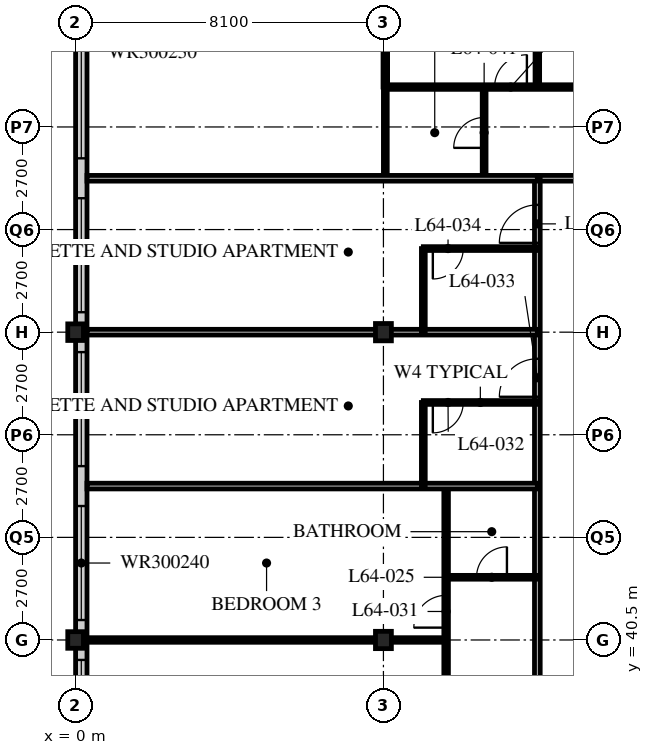
"""IFC4 building model, lengths in metres.
Left out: names, types, materials, properties, quantities, classifications, styles, units other than length and angle.
Written with IfcOpenShell. Run it as: python <this file> out.ifc"""

import sys

from ifc_helpers import new_model, si_unit, direction, frame, frame_2d, origin, origin_2d, place, context, subcontext, project, spatial, rectangle, i_section, extrude, element, fill, save


model = new_model("IFC4")
c1 = context("Model", 3, precision=1e-05, world=origin(), true_north=direction((0.0, 1.0)))
c2 = subcontext(c1, "Body", "Model", "MODEL_VIEW")
j1 = project(units=[si_unit("LENGTHUNIT", "METRE"), si_unit("PLANEANGLEUNIT", "RADIAN")], contexts=[c1])
p1 = place(None, origin())
s1 = spatial("IfcSite", under=j1, at=p1, CompositionType="ELEMENT")
p2 = place(p1, origin())
s2 = spatial("IfcBuilding", under=s1, at=p2, CompositionType="ELEMENT")
p3 = place(p2, frame((0.0, 0.0, 250.2)))
s3 = spatial("IfcBuildingStorey", under=s2, at=p3, CompositionType="ELEMENT", Elevation=250.2)
for number, where, z_axis, x_axis in (
    (1, (0.0, 40.5, 0.0), (0.0, 0.0, 1.0), (1.0, 0.0, 0.0)),
    (2, (0.0, 48.6, 0.0), (0.0, 0.0, 1.0), (1.0, 0.0, 0.0)),
):
    element("IfcColumn", number, at=place(p3, frame(where, z_axis=z_axis, x_axis=x_axis)), inside=s3, PredefinedType="COLUMN", context=c2, shape_type="SweptSolid", body=[
        extrude(i_section(OverallWidth=0.412, OverallDepth=0.437, WebThickness=0.036, FlangeThickness=0.058, FilletRadius=0.015, at=origin_2d()), origin(), (0.0, 0.0, 1.0), 3.9),
    ])
for number, where, z_axis, x_axis in (
    (3, (8.1, 40.5, 0.0), (0.0, 0.0, 1.0), (1.0, 0.0, 0.0)),
    (4, (8.1, 48.6, 0.0), (0.0, 0.0, 1.0), (1.0, 0.0, 0.0)),
):
    element("IfcColumn", number, at=place(p3, frame(where, z_axis=z_axis, x_axis=x_axis)), inside=s3, PredefinedType="COLUMN", context=c2, shape_type="SweptSolid", body=[
        extrude(i_section(OverallWidth=0.418, OverallDepth=0.456, WebThickness=0.042, FlangeThickness=0.067, FilletRadius=0.015, at=origin_2d()), origin(), (0.0, 0.0, 1.0), 3.9),
    ])
p4 = place(p3, frame((0.15, 56.4, 0.0), z_axis=(0.0, 0.0, 1.0), x_axis=(0.0, -1.0, 0.0)))
e5 = element("IfcWall", 5, at=p4, inside=s3, PredefinedType="SOLIDWALL", context=c2, shape_type="SweptSolid", body=[
    extrude(rectangle(XDim=32.1, YDim=0.3, at=frame_2d((16.05, 0.0))), origin(), (0.0, 0.0, 1.0), 3.69),
])
p5 = place(p4, frame((0.225, 0.0, 0.6)))
e6 = element("IfcOpeningElement", 6, at=p5, cuts=e5, PredefinedType="OPENING", context=c2, shape_type="SweptSolid", body=[
    extrude(rectangle(XDim=3.0, YDim=2.4, at=frame_2d((1.5, 1.2))), frame((0.0, 0.16, 0.0), z_axis=(0.0, -1.0, 0.0), x_axis=(1.0, 0.0, 0.0)), (0.0, 0.0, 1.0), 0.32),
])
p6 = place(p4, frame((4.275, 0.0, 0.6)))
e7 = element("IfcOpeningElement", 7, at=p6, cuts=e5, PredefinedType="OPENING", context=c2, shape_type="SweptSolid", body=[
    extrude(rectangle(XDim=3.0, YDim=2.4, at=frame_2d((1.5, 1.2))), frame((0.0, 0.16, 0.0), z_axis=(0.0, -1.0, 0.0), x_axis=(1.0, 0.0, 0.0)), (0.0, 0.0, 1.0), 0.32),
])
p7 = place(p4, frame((8.325, 0.0, 0.6)))
e8 = element("IfcOpeningElement", 8, at=p7, cuts=e5, PredefinedType="OPENING", context=c2, shape_type="SweptSolid", body=[
    extrude(rectangle(XDim=3.0, YDim=2.4, at=frame_2d((1.5, 1.2))), frame((0.0, 0.16, 0.0), z_axis=(0.0, -1.0, 0.0), x_axis=(1.0, 0.0, 0.0)), (0.0, 0.0, 1.0), 0.32),
])
p8 = place(p4, frame((12.375, 0.0, 0.6)))
e9 = element("IfcOpeningElement", 9, at=p8, cuts=e5, PredefinedType="OPENING", context=c2, shape_type="SweptSolid", body=[
    extrude(rectangle(XDim=3.0, YDim=2.4, at=frame_2d((1.5, 1.2))), frame((0.0, 0.16, 0.0), z_axis=(0.0, -1.0, 0.0), x_axis=(1.0, 0.0, 0.0)), (0.0, 0.0, 1.0), 0.32),
])
p9 = place(p4, frame((16.425, 0.0, 0.6)))
e10 = element("IfcOpeningElement", 10, at=p9, cuts=e5, PredefinedType="OPENING", context=c2, shape_type="SweptSolid", body=[
    extrude(rectangle(XDim=3.0, YDim=2.4, at=frame_2d((1.5, 1.2))), frame((0.0, 0.16, 0.0), z_axis=(0.0, -1.0, 0.0), x_axis=(1.0, 0.0, 0.0)), (0.0, 0.0, 1.0), 0.32),
])
p10 = place(p4, frame((20.475, 0.0, 0.6)))
e11 = element("IfcOpeningElement", 11, at=p10, cuts=e5, PredefinedType="OPENING", context=c2, shape_type="SweptSolid", body=[
    extrude(rectangle(XDim=3.0, YDim=2.4, at=frame_2d((1.5, 1.2))), frame((0.0, 0.16, 0.0), z_axis=(0.0, -1.0, 0.0), x_axis=(1.0, 0.0, 0.0)), (0.0, 0.0, 1.0), 0.32),
])
p11 = place(p4, frame((24.525, 0.0, 0.6)))
e12 = element("IfcOpeningElement", 12, at=p11, cuts=e5, PredefinedType="OPENING", context=c2, shape_type="SweptSolid", body=[
    extrude(rectangle(XDim=3.0, YDim=2.4, at=frame_2d((1.5, 1.2))), frame((0.0, 0.16, 0.0), z_axis=(0.0, -1.0, 0.0), x_axis=(1.0, 0.0, 0.0)), (0.0, 0.0, 1.0), 0.32),
])
p12 = place(p4, frame((28.575, 0.0, 0.6)))
e13 = element("IfcOpeningElement", 13, at=p12, cuts=e5, PredefinedType="OPENING", context=c2, shape_type="SweptSolid", body=[
    extrude(rectangle(XDim=3.0, YDim=2.4, at=frame_2d((1.5, 1.2))), frame((0.0, 0.16, 0.0), z_axis=(0.0, -1.0, 0.0), x_axis=(1.0, 0.0, 0.0)), (0.0, 0.0, 1.0), 0.32),
])
p13 = place(p3, frame((12.15, 52.65, 0.0), z_axis=(0.0, 0.0, 1.0), x_axis=(1.0, 0.0, 0.0)))
e14 = element("IfcWall", 14, at=p13, inside=s3, PredefinedType="PARTITIONING", context=c2, shape_type="SweptSolid", body=[
    extrude(rectangle(XDim=24.3, YDim=0.15, at=frame_2d((12.15, 0.0))), origin(), (0.0, 0.0, 1.0), 3.69),
])
p14 = place(p13, frame((4.45, 0.0, 0.0)))
e15 = element("IfcOpeningElement", 15, at=p14, cuts=e14, PredefinedType="OPENING", context=c2, shape_type="SweptSolid", body=[
    extrude(rectangle(XDim=1.0, YDim=2.1, at=frame_2d((0.5, 1.05))), frame((0.0, 0.085, 0.0), z_axis=(0.0, -1.0, 0.0), x_axis=(1.0, 0.0, 0.0)), (0.0, 0.0, 1.0), 0.17),
])
p15 = place(p13, frame((1.525, 0.0, 0.0)))
e16 = element("IfcOpeningElement", 16, at=p15, cuts=e14, PredefinedType="OPENING", context=c2, shape_type="SweptSolid", body=[
    extrude(rectangle(XDim=1.0, YDim=2.1, at=frame_2d((0.5, 1.05))), frame((0.0, 0.085, 0.0), z_axis=(0.0, -1.0, 0.0), x_axis=(1.0, 0.0, 0.0)), (0.0, 0.0, 1.0), 0.17),
])
p16 = place(p3, frame((12.15, 22.5, 0.0), z_axis=(0.0, 0.0, 1.0), x_axis=(0.0, 1.0, 0.0)))
e17 = element("IfcWall", 17, at=p16, inside=s3, PredefinedType="PARTITIONING", context=c2, shape_type="SweptSolid", body=[
    extrude(rectangle(XDim=30.15, YDim=0.15, at=frame_2d((15.075, 0.0))), origin(), (0.0, 0.0, 1.0), 3.69),
])
p17 = place(p16, frame((0.4, 0.0, 0.0)))
e18 = element("IfcOpeningElement", 18, at=p17, cuts=e17, PredefinedType="OPENING", context=c2, shape_type="SweptSolid", body=[
    extrude(rectangle(XDim=1.0, YDim=2.1, at=frame_2d((0.5, 1.05))), frame((0.0, 0.085, 0.0), z_axis=(0.0, -1.0, 0.0), x_axis=(1.0, 0.0, 0.0)), (0.0, 0.0, 1.0), 0.17),
])
p18 = place(p16, frame((24.4, 0.0, 0.0)))
e19 = element("IfcOpeningElement", 19, at=p18, cuts=e17, PredefinedType="OPENING", context=c2, shape_type="SweptSolid", body=[
    extrude(rectangle(XDim=1.0, YDim=2.1, at=frame_2d((0.5, 1.05))), frame((0.0, 0.085, 0.0), z_axis=(0.0, -1.0, 0.0), x_axis=(1.0, 0.0, 0.0)), (0.0, 0.0, 1.0), 0.17),
])
p19 = place(p16, frame((28.45, 0.0, 0.0)))
e20 = element("IfcOpeningElement", 20, at=p19, cuts=e17, PredefinedType="OPENING", context=c2, shape_type="SweptSolid", body=[
    extrude(rectangle(XDim=1.0, YDim=2.1, at=frame_2d((0.5, 1.05))), frame((0.0, 0.085, 0.0), z_axis=(0.0, -1.0, 0.0), x_axis=(1.0, 0.0, 0.0)), (0.0, 0.0, 1.0), 0.17),
])
p20 = place(p3, frame((9.75, 22.5, 0.0), z_axis=(0.0, 0.0, 1.0), x_axis=(0.0, 1.0, 0.0)))
e21 = element("IfcWall", 21, at=p20, inside=s3, PredefinedType="PARTITIONING", context=c2, shape_type="SweptSolid", body=[
    extrude(rectangle(XDim=22.05, YDim=0.12, at=frame_2d((11.025, 0.0))), origin(), (0.0, 0.0, 1.0), 3.69),
])
p21 = place(p20, frame((0.975, 0.0, 0.0)))
e22 = element("IfcOpeningElement", 22, at=p21, cuts=e21, PredefinedType="OPENING", context=c2, shape_type="SweptSolid", body=[
    extrude(rectangle(XDim=0.85, YDim=2.1, at=frame_2d((0.425, 1.05))), frame((0.0, 0.07, 0.0), z_axis=(0.0, -1.0, 0.0), x_axis=(1.0, 0.0, 0.0)), (0.0, 0.0, 1.0), 0.14),
])
p22 = place(p20, frame((10.225, 0.0, 0.0)))
e23 = element("IfcOpeningElement", 23, at=p22, cuts=e21, PredefinedType="OPENING", context=c2, shape_type="SweptSolid", body=[
    extrude(rectangle(XDim=0.85, YDim=2.1, at=frame_2d((0.425, 1.05))), frame((0.0, 0.07, 0.0), z_axis=(0.0, -1.0, 0.0), x_axis=(1.0, 0.0, 0.0)), (0.0, 0.0, 1.0), 0.14),
])
p23 = place(p20, frame((14.275, 0.0, 0.0)))
e24 = element("IfcOpeningElement", 24, at=p23, cuts=e21, PredefinedType="OPENING", context=c2, shape_type="SweptSolid", body=[
    extrude(rectangle(XDim=0.85, YDim=2.1, at=frame_2d((0.425, 1.05))), frame((0.0, 0.07, 0.0), z_axis=(0.0, -1.0, 0.0), x_axis=(1.0, 0.0, 0.0)), (0.0, 0.0, 1.0), 0.14),
])
p24 = place(p20, frame((18.325, 0.0, 0.0)))
e25 = element("IfcOpeningElement", 25, at=p24, cuts=e21, PredefinedType="OPENING", context=c2, shape_type="SweptSolid", body=[
    extrude(rectangle(XDim=0.85, YDim=2.1, at=frame_2d((0.425, 1.05))), frame((0.0, 0.07, 0.0), z_axis=(0.0, -1.0, 0.0), x_axis=(1.0, 0.0, 0.0)), (0.0, 0.0, 1.0), 0.14),
])
p25 = place(p3, frame((12.15, 42.15, 0.0), z_axis=(0.0, 0.0, 1.0), x_axis=(-1.0, 0.0, 0.0)))
e26 = element("IfcWall", 26, at=p25, inside=s3, PredefinedType="PARTITIONING", context=c2, shape_type="SweptSolid", body=[
    extrude(rectangle(XDim=2.4, YDim=0.1, at=frame_2d((1.2, 0.0))), origin(), (0.0, 0.0, 1.0), 3.69),
])
p26 = place(p25, frame((0.8, 0.0, 0.0)))
e27 = element("IfcOpeningElement", 27, at=p26, cuts=e26, PredefinedType="OPENING", context=c2, shape_type="SweptSolid", body=[
    extrude(rectangle(XDim=0.8, YDim=2.1, at=frame_2d((0.4, 1.05))), frame((0.0, 0.06, 0.0), z_axis=(0.0, -1.0, 0.0), x_axis=(1.0, 0.0, 0.0)), (0.0, 0.0, 1.0), 0.12),
])
p27 = place(p3, frame((9.75, 40.5, 0.0), z_axis=(0.0, 0.0, 1.0), x_axis=(-1.0, 0.0, 0.0)))
e28 = element("IfcWall", 28, at=p27, inside=s3, PredefinedType="PARTITIONING", context=c2, shape_type="SweptSolid", body=[
    extrude(rectangle(XDim=9.45, YDim=0.12, at=frame_2d((4.725, 0.0))), origin(), (0.0, 0.0, 1.0), 3.078),
])
p28 = place(p3, frame((12.15, 44.55, 0.0), z_axis=(0.0, 0.0, 1.0), x_axis=(-1.0, 0.0, 0.0)))
e29 = element("IfcWall", 29, at=p28, inside=s3, PredefinedType="PARTITIONING", context=c2, shape_type="SweptSolid", body=[
    extrude(rectangle(XDim=11.85, YDim=0.15, at=frame_2d((5.925, 0.0))), origin(), (0.0, 0.0, 1.0), 3.69),
])
p29 = place(p3, frame((9.15, 44.55, 0.0), z_axis=(0.0, 0.0, 1.0), x_axis=(0.0, 1.0, 0.0)))
e30 = element("IfcWall", 30, at=p29, inside=s3, PredefinedType="PARTITIONING", context=c2, shape_type="SweptSolid", body=[
    extrude(rectangle(XDim=2.2, YDim=0.1, at=frame_2d((1.1, 0.0))), origin(), (0.0, 0.0, 1.0), 3.69),
])
p30 = place(p3, frame((12.15, 46.75, 0.0), z_axis=(0.0, 0.0, 1.0), x_axis=(-1.0, 0.0, 0.0)))
e31 = element("IfcWall", 31, at=p30, inside=s3, PredefinedType="PARTITIONING", context=c2, shape_type="SweptSolid", body=[
    extrude(rectangle(XDim=3.0, YDim=0.1, at=frame_2d((1.5, 0.0))), origin(), (0.0, 0.0, 1.0), 3.69),
])
p31 = place(p30, frame((1.95, 0.0, 0.0)))
e32 = element("IfcOpeningElement", 32, at=p31, cuts=e31, PredefinedType="OPENING", context=c2, shape_type="SweptSolid", body=[
    extrude(rectangle(XDim=0.8, YDim=2.1, at=frame_2d((0.4, 1.05))), frame((0.0, 0.06, 0.0), z_axis=(0.0, -1.0, 0.0), x_axis=(1.0, 0.0, 0.0)), (0.0, 0.0, 1.0), 0.12),
])
p32 = place(p3, frame((12.15, 48.6, 0.0), z_axis=(0.0, 0.0, 1.0), x_axis=(-1.0, 0.0, 0.0)))
e33 = element("IfcWall", 33, at=p32, inside=s3, PredefinedType="PARTITIONING", context=c2, shape_type="SweptSolid", body=[
    extrude(rectangle(XDim=11.85, YDim=0.15, at=frame_2d((5.925, 0.0))), origin(), (0.0, 0.0, 1.0), 3.078),
])
p33 = place(p3, frame((9.15, 48.6, 0.0), z_axis=(0.0, 0.0, 1.0), x_axis=(0.0, 1.0, 0.0)))
e34 = element("IfcWall", 34, at=p33, inside=s3, PredefinedType="PARTITIONING", context=c2, shape_type="SweptSolid", body=[
    extrude(rectangle(XDim=2.2, YDim=0.1, at=frame_2d((1.1, 0.0))), origin(), (0.0, 0.0, 1.0), 3.69),
])
p34 = place(p3, frame((12.15, 50.8, 0.0), z_axis=(0.0, 0.0, 1.0), x_axis=(-1.0, 0.0, 0.0)))
e35 = element("IfcWall", 35, at=p34, inside=s3, PredefinedType="PARTITIONING", context=c2, shape_type="SweptSolid", body=[
    extrude(rectangle(XDim=3.0, YDim=0.1, at=frame_2d((1.5, 0.0))), origin(), (0.0, 0.0, 1.0), 3.69),
])
p35 = place(p34, frame((1.95, 0.0, 0.0)))
e36 = element("IfcOpeningElement", 36, at=p35, cuts=e35, PredefinedType="OPENING", context=c2, shape_type="SweptSolid", body=[
    extrude(rectangle(XDim=0.8, YDim=2.1, at=frame_2d((0.4, 1.05))), frame((0.0, 0.06, 0.0), z_axis=(0.0, -1.0, 0.0), x_axis=(1.0, 0.0, 0.0)), (0.0, 0.0, 1.0), 0.12),
])
p36 = place(p3, frame((10.75, 52.65, 0.0), z_axis=(0.0, 0.0, 1.0), x_axis=(0.0, 1.0, 0.0)))
e37 = element("IfcWall", 37, at=p36, inside=s3, PredefinedType="PARTITIONING", context=c2, shape_type="SweptSolid", body=[
    extrude(rectangle(XDim=2.4, YDim=0.1, at=frame_2d((1.2, 0.0))), origin(), (0.0, 0.0, 1.0), 3.69),
])
p37 = place(p36, frame((0.8, 0.0, 0.0)))
e38 = element("IfcOpeningElement", 38, at=p37, cuts=e37, PredefinedType="OPENING", context=c2, shape_type="SweptSolid", body=[
    extrude(rectangle(XDim=0.8, YDim=2.1, at=frame_2d((0.4, 1.05))), frame((0.0, 0.06, 0.0), z_axis=(0.0, -1.0, 0.0), x_axis=(1.0, 0.0, 0.0)), (0.0, 0.0, 1.0), 0.12),
])
p38 = place(p3, frame((8.15, 52.65, 0.0), z_axis=(0.0, 0.0, 1.0), x_axis=(0.0, 1.0, 0.0)))
e39 = element("IfcWall", 39, at=p38, inside=s3, PredefinedType="PARTITIONING", context=c2, shape_type="SweptSolid", body=[
    extrude(rectangle(XDim=2.4, YDim=0.1, at=frame_2d((1.2, 0.0))), origin(), (0.0, 0.0, 1.0), 3.078),
])
p39 = place(p3, frame((8.15, 55.05, 0.0), z_axis=(0.0, 0.0, 1.0), x_axis=(1.0, 0.0, 0.0)))
e40 = element("IfcWall", 40, at=p39, inside=s3, PredefinedType="PARTITIONING", context=c2, shape_type="SweptSolid", body=[
    extrude(rectangle(XDim=28.3, YDim=0.12, at=frame_2d((14.15, 0.0))), origin(), (0.0, 0.0, 1.0), 3.69),
])
p40 = place(p39, frame((9.025, 0.0, 0.0)))
e41 = element("IfcOpeningElement", 41, at=p40, cuts=e40, PredefinedType="OPENING", context=c2, shape_type="SweptSolid", body=[
    extrude(rectangle(XDim=0.85, YDim=2.1, at=frame_2d((0.425, 1.05))), frame((0.0, 0.07, 0.0), z_axis=(0.0, -1.0, 0.0), x_axis=(1.0, 0.0, 0.0)), (0.0, 0.0, 1.0), 0.14),
])
p41 = place(p39, frame((16.475, 0.0, 0.0)))
e42 = element("IfcOpeningElement", 42, at=p41, cuts=e40, PredefinedType="OPENING", context=c2, shape_type="SweptSolid", body=[
    extrude(rectangle(XDim=0.85, YDim=2.1, at=frame_2d((0.425, 1.05))), frame((0.0, 0.07, 0.0), z_axis=(0.0, -1.0, 0.0), x_axis=(1.0, 0.0, 0.0)), (0.0, 0.0, 1.0), 0.14),
])
p42 = place(p39, frame((20.525, 0.0, 0.0)))
e43 = element("IfcOpeningElement", 43, at=p42, cuts=e40, PredefinedType="OPENING", context=c2, shape_type="SweptSolid", body=[
    extrude(rectangle(XDim=0.85, YDim=2.1, at=frame_2d((0.425, 1.05))), frame((0.0, 0.07, 0.0), z_axis=(0.0, -1.0, 0.0), x_axis=(1.0, 0.0, 0.0)), (0.0, 0.0, 1.0), 0.14),
])
p43 = place(p39, frame((24.575, 0.0, 0.0)))
e44 = element("IfcOpeningElement", 44, at=p43, cuts=e40, PredefinedType="OPENING", context=c2, shape_type="SweptSolid", body=[
    extrude(rectangle(XDim=0.85, YDim=2.1, at=frame_2d((0.425, 1.05))), frame((0.0, 0.07, 0.0), z_axis=(0.0, -1.0, 0.0), x_axis=(1.0, 0.0, 0.0)), (0.0, 0.0, 1.0), 0.14),
])
p44 = place(p39, frame((6.725, 0.0, 0.0)))
e45 = element("IfcOpeningElement", 45, at=p44, cuts=e40, PredefinedType="OPENING", context=c2, shape_type="SweptSolid", body=[
    extrude(rectangle(XDim=0.85, YDim=2.1, at=frame_2d((0.425, 1.05))), frame((0.0, 0.07, 0.0), z_axis=(0.0, -1.0, 0.0), x_axis=(1.0, 0.0, 0.0)), (0.0, 0.0, 1.0), 0.14),
])
p45 = place(p39, frame((2.875, 0.0, 0.0)))
e46 = element("IfcOpeningElement", 46, at=p45, cuts=e40, PredefinedType="OPENING", context=c2, shape_type="SweptSolid", body=[
    extrude(rectangle(XDim=0.85, YDim=2.1, at=frame_2d((0.425, 1.05))), frame((0.0, 0.07, 0.0), z_axis=(0.0, -1.0, 0.0), x_axis=(1.0, 0.0, 0.0)), (0.0, 0.0, 1.0), 0.14),
])
p46 = place(p3, frame((12.15, 55.05, 0.0), z_axis=(0.0, 0.0, 1.0), x_axis=(0.0, 1.0, 0.0)))
e47 = element("IfcWall", 47, at=p46, inside=s3, PredefinedType="PARTITIONING", context=c2, shape_type="SweptSolid", body=[
    extrude(rectangle(XDim=9.45, YDim=0.12, at=frame_2d((4.725, 0.0))), origin(), (0.0, 0.0, 1.0), 3.69),
])
p47 = place(p3, frame((0.3, 52.65, 0.0), z_axis=(0.0, 0.0, 1.0), x_axis=(1.0, 0.0, 0.0)))
e48 = element("IfcWall", 48, at=p47, inside=s3, PredefinedType="PARTITIONING", context=c2, shape_type="SweptSolid", body=[
    extrude(rectangle(XDim=11.85, YDim=0.15, at=frame_2d((5.925, 0.0))), origin(), (0.0, 0.0, 1.0), 3.69),
])
p48 = place(p3, frame((8.15, 55.05, 0.0), z_axis=(0.0, 0.0, 1.0), x_axis=(0.0, 1.0, 0.0)))
e49 = element("IfcWall", 49, at=p48, inside=s3, PredefinedType="PARTITIONING", context=c2, shape_type="SweptSolid", body=[
    extrude(rectangle(XDim=1.447, YDim=0.12, at=frame_2d((0.724, 0.0))), origin(), (0.0, 0.0, 1.0), 3.078),
])
p49 = place(p5, origin())
e50 = element("IfcWindow", 50, at=p49, inside=s3, PartitioningType="SINGLE_PANEL", PredefinedType="WINDOW", context=c2, shape_type="SweptSolid", body=[
    extrude(rectangle(XDim=3.0, YDim=2.4, at=frame_2d((1.5, 1.2))), frame((0.0, 0.03, 0.0), z_axis=(0.0, -1.0, 0.0), x_axis=(1.0, 0.0, 0.0)), (0.0, 0.0, 1.0), 0.06),
])
fill(e6, e50)
p50 = place(p6, origin())
e51 = element("IfcWindow", 51, at=p50, inside=s3, PartitioningType="SINGLE_PANEL", PredefinedType="WINDOW", context=c2, shape_type="SweptSolid", body=[
    extrude(rectangle(XDim=3.0, YDim=2.4, at=frame_2d((1.5, 1.2))), frame((0.0, 0.03, 0.0), z_axis=(0.0, -1.0, 0.0), x_axis=(1.0, 0.0, 0.0)), (0.0, 0.0, 1.0), 0.06),
])
fill(e7, e51)
p51 = place(p7, origin())
e52 = element("IfcWindow", 52, at=p51, inside=s3, PartitioningType="SINGLE_PANEL", PredefinedType="WINDOW", context=c2, shape_type="SweptSolid", body=[
    extrude(rectangle(XDim=3.0, YDim=2.4, at=frame_2d((1.5, 1.2))), frame((0.0, 0.03, 0.0), z_axis=(0.0, -1.0, 0.0), x_axis=(1.0, 0.0, 0.0)), (0.0, 0.0, 1.0), 0.06),
])
fill(e8, e52)
p52 = place(p8, origin())
e53 = element("IfcWindow", 53, at=p52, inside=s3, PartitioningType="SINGLE_PANEL", PredefinedType="WINDOW", context=c2, shape_type="SweptSolid", body=[
    extrude(rectangle(XDim=3.0, YDim=2.4, at=frame_2d((1.5, 1.2))), frame((0.0, 0.03, 0.0), z_axis=(0.0, -1.0, 0.0), x_axis=(1.0, 0.0, 0.0)), (0.0, 0.0, 1.0), 0.06),
])
fill(e9, e53)
p53 = place(p9, origin())
e54 = element("IfcWindow", 54, at=p53, inside=s3, PartitioningType="SINGLE_PANEL", PredefinedType="WINDOW", context=c2, shape_type="SweptSolid", body=[
    extrude(rectangle(XDim=3.0, YDim=2.4, at=frame_2d((1.5, 1.2))), frame((0.0, 0.03, 0.0), z_axis=(0.0, -1.0, 0.0), x_axis=(1.0, 0.0, 0.0)), (0.0, 0.0, 1.0), 0.06),
])
fill(e10, e54)
p54 = place(p26, origin())
e55 = element("IfcDoor", 55, at=p54, inside=s3, OperationType="SINGLE_SWING_RIGHT", PredefinedType="DOOR", context=c2, shape_type="SweptSolid", body=[
    extrude(rectangle(XDim=0.8, YDim=2.1, at=frame_2d((0.4, 1.05))), frame((0.0, 0.025, 0.0), z_axis=(0.0, -1.0, 0.0), x_axis=(1.0, 0.0, 0.0)), (0.0, 0.0, 1.0), 0.05),
])
fill(e27, e55)
p55 = place(p24, origin())
e56 = element("IfcDoor", 56, at=p55, inside=s3, OperationType="SINGLE_SWING_LEFT", PredefinedType="DOOR", context=c2, shape_type="SweptSolid", body=[
    extrude(rectangle(XDim=0.85, YDim=2.1, at=frame_2d((0.425, 1.05))), frame((0.0, 0.025, 0.0), z_axis=(0.0, -1.0, 0.0), x_axis=(1.0, 0.0, 0.0)), (0.0, 0.0, 1.0), 0.05),
])
fill(e25, e56)
p56 = place(p31, origin())
e57 = element("IfcDoor", 57, at=p56, inside=s3, OperationType="SINGLE_SWING_RIGHT", PredefinedType="DOOR", context=c2, shape_type="SweptSolid", body=[
    extrude(rectangle(XDim=0.8, YDim=2.1, at=frame_2d((0.4, 1.05))), frame((0.0, 0.025, 0.0), z_axis=(0.0, -1.0, 0.0), x_axis=(1.0, 0.0, 0.0)), (0.0, 0.0, 1.0), 0.05),
])
fill(e32, e57)
p57 = place(p18, origin())
e58 = element("IfcDoor", 58, at=p57, inside=s3, OperationType="SINGLE_SWING_LEFT", PredefinedType="DOOR", context=c2, shape_type="SweptSolid", body=[
    extrude(rectangle(XDim=1.0, YDim=2.1, at=frame_2d((0.5, 1.05))), frame((0.0, 0.025, 0.0), z_axis=(0.0, -1.0, 0.0), x_axis=(1.0, 0.0, 0.0)), (0.0, 0.0, 1.0), 0.05),
])
fill(e19, e58)
p58 = place(p35, origin())
e59 = element("IfcDoor", 59, at=p58, inside=s3, OperationType="SINGLE_SWING_RIGHT", PredefinedType="DOOR", context=c2, shape_type="SweptSolid", body=[
    extrude(rectangle(XDim=0.8, YDim=2.1, at=frame_2d((0.4, 1.05))), frame((0.0, 0.025, 0.0), z_axis=(0.0, -1.0, 0.0), x_axis=(1.0, 0.0, 0.0)), (0.0, 0.0, 1.0), 0.05),
])
fill(e36, e59)
p59 = place(p19, origin())
e60 = element("IfcDoor", 60, at=p59, inside=s3, OperationType="SINGLE_SWING_LEFT", PredefinedType="DOOR", context=c2, shape_type="SweptSolid", body=[
    extrude(rectangle(XDim=1.0, YDim=2.1, at=frame_2d((0.5, 1.05))), frame((0.0, 0.025, 0.0), z_axis=(0.0, -1.0, 0.0), x_axis=(1.0, 0.0, 0.0)), (0.0, 0.0, 1.0), 0.05),
])
fill(e20, e60)
p60 = place(p37, origin())
e61 = element("IfcDoor", 61, at=p60, inside=s3, OperationType="SINGLE_SWING_LEFT", PredefinedType="DOOR", context=c2, shape_type="SweptSolid", body=[
    extrude(rectangle(XDim=0.8, YDim=2.1, at=frame_2d((0.4, 1.05))), frame((0.0, 0.025, 0.0), z_axis=(0.0, -1.0, 0.0), x_axis=(1.0, 0.0, 0.0)), (0.0, 0.0, 1.0), 0.05),
])
fill(e38, e61)
p61 = place(p45, origin())
e62 = element("IfcDoor", 62, at=p61, inside=s3, OperationType="SINGLE_SWING_RIGHT", PredefinedType="DOOR", context=c2, shape_type="SweptSolid", body=[
    extrude(rectangle(XDim=0.85, YDim=2.1, at=frame_2d((0.425, 1.05))), frame((0.0, 0.025, 0.0), z_axis=(0.0, -1.0, 0.0), x_axis=(1.0, 0.0, 0.0)), (0.0, 0.0, 1.0), 0.05),
])
fill(e46, e62)
save(model, sys.argv[1])
